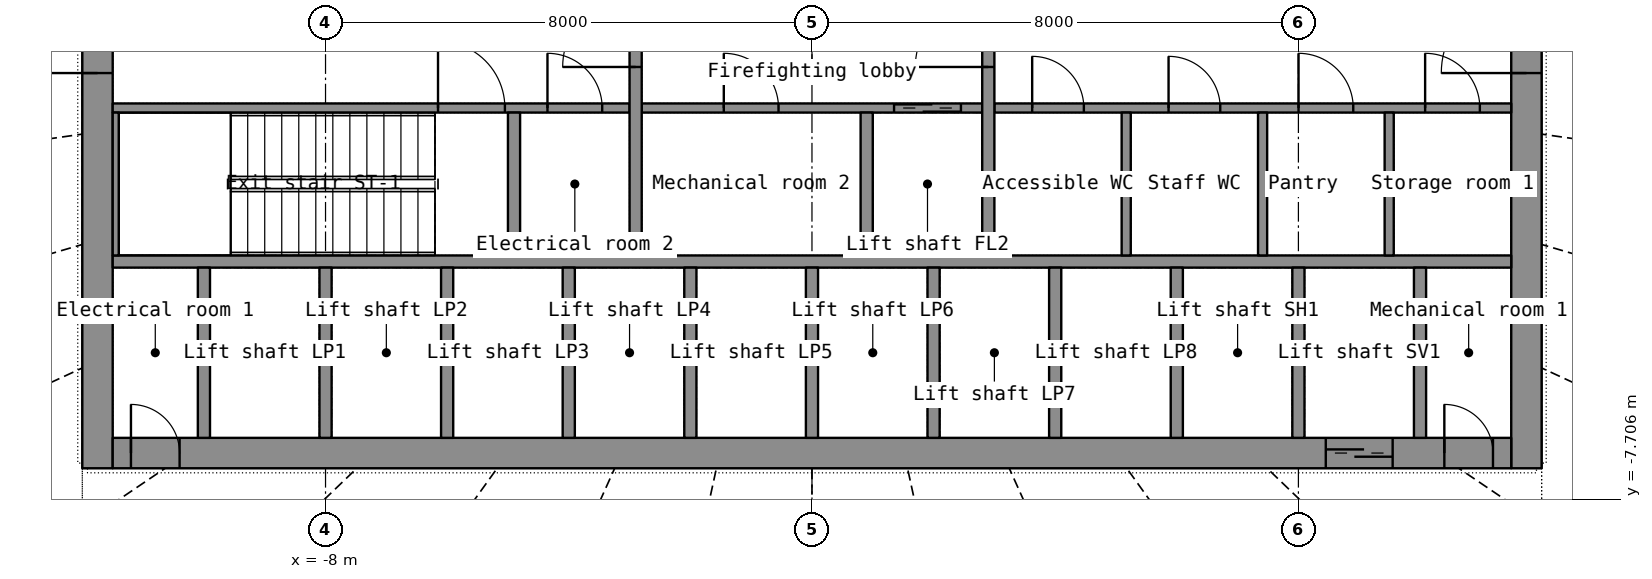
"""IFC4 building model, lengths in metres.
Left out: names, types, materials, properties, quantities, classifications, styles, units other than length and angle.
Written with IfcOpenShell. Run it as: python <this file> out.ifc"""

import sys

from ifc_helpers import new_model, si_unit, direction, frame, frame_2d, origin, place, context, subcontext, project, spatial, rectangle, extrude, element, fill, save


model = new_model("IFC4")
c1 = context("Model", 3, precision=1e-05, world=origin(), true_north=direction((0.0, 1.0)))
c2 = subcontext(c1, "Body", "Model", "MODEL_VIEW")
j1 = project(units=[si_unit("LENGTHUNIT", "METRE"), si_unit("PLANEANGLEUNIT", "RADIAN")], contexts=[c1])
p1 = place(None, origin())
s1 = spatial("IfcSite", under=j1, at=p1, CompositionType="ELEMENT")
p2 = place(p1, origin())
s2 = spatial("IfcBuilding", under=s1, at=p2, CompositionType="ELEMENT")
p3 = place(p2, frame((0.0, 0.0, 152.6)))
s3 = spatial("IfcBuildingStorey", under=s2, at=p3, CompositionType="ELEMENT", Elevation=152.6)
p4 = place(p3, frame((-11.75, -7.2, 0.0), z_axis=(0.0, 0.0, 1.0), x_axis=(0.0, 1.0, 0.0)))
e1 = element("IfcWall", 1, at=p4, inside=s3, PredefinedType="SHEAR", context=c2, shape_type="SweptSolid", body=[
    extrude(rectangle(XDim=14.4, YDim=0.5, at=frame_2d((7.2, 0.0))), origin(), (0.0, 0.0, 1.0), 4.1),
])
p5 = place(p4, frame((6.5, 0.0, 0.0)))
e2 = element("IfcOpeningElement", 2, at=p5, cuts=e1, PredefinedType="OPENING", context=c2, shape_type="SweptSolid", body=[
    extrude(rectangle(XDim=1.4, YDim=2.2, at=frame_2d((0.7, 1.1))), frame((0.0, 0.26, 0.0), z_axis=(0.0, -1.0, 0.0), x_axis=(1.0, 0.0, 0.0)), (0.0, 0.0, 1.0), 0.52),
])
p6 = place(p3, frame((11.75, -7.2, 0.0), z_axis=(0.0, 0.0, 1.0), x_axis=(0.0, 1.0, 0.0)))
e3 = element("IfcWall", 3, at=p6, inside=s3, PredefinedType="SHEAR", context=c2, shape_type="SweptSolid", body=[
    extrude(rectangle(XDim=14.4, YDim=0.5, at=frame_2d((7.2, 0.0))), origin(), (0.0, 0.0, 1.0), 4.1),
])
p7 = place(p6, frame((6.5, 0.0, 0.0)))
e4 = element("IfcOpeningElement", 4, at=p7, cuts=e3, PredefinedType="OPENING", context=c2, shape_type="SweptSolid", body=[
    extrude(rectangle(XDim=1.4, YDim=2.2, at=frame_2d((0.7, 1.1))), frame((0.0, 0.26, 0.0), z_axis=(0.0, -1.0, 0.0), x_axis=(1.0, 0.0, 0.0)), (0.0, 0.0, 1.0), 0.52),
])
p8 = place(p3, frame((-11.5, -6.95, 0.0), z_axis=(0.0, 0.0, 1.0), x_axis=(1.0, 0.0, 0.0)))
e5 = element("IfcWall", 5, at=p8, inside=s3, PredefinedType="SHEAR", context=c2, shape_type="SweptSolid", body=[
    extrude(rectangle(XDim=23.0, YDim=0.5, at=frame_2d((11.5, 0.0))), origin(), (0.0, 0.0, 1.0), 4.1),
])
p9 = place(p8, frame((19.95, 0.0, 0.0)))
e6 = element("IfcOpeningElement", 6, at=p9, cuts=e5, PredefinedType="OPENING", context=c2, shape_type="SweptSolid", body=[
    extrude(rectangle(XDim=1.1, YDim=2.2, at=frame_2d((0.55, 1.1))), frame((0.0, 0.26, 0.0), z_axis=(0.0, -1.0, 0.0), x_axis=(1.0, 0.0, 0.0)), (0.0, 0.0, 1.0), 0.52),
])
p10 = place(p8, frame((0.3, 0.0, 0.0)))
e7 = element("IfcOpeningElement", 7, at=p10, cuts=e5, PredefinedType="OPENING", context=c2, shape_type="SweptSolid", body=[
    extrude(rectangle(XDim=0.8, YDim=2.05, at=frame_2d((0.4, 1.025))), frame((0.0, 0.26, 0.0), z_axis=(0.0, -1.0, 0.0), x_axis=(1.0, 0.0, 0.0)), (0.0, 0.0, 1.0), 0.52),
])
p11 = place(p8, frame((21.9, 0.0, 0.0)))
e8 = element("IfcOpeningElement", 8, at=p11, cuts=e5, PredefinedType="OPENING", context=c2, shape_type="SweptSolid", body=[
    extrude(rectangle(XDim=0.8, YDim=2.05, at=frame_2d((0.4, 1.025))), frame((0.0, 0.26, 0.0), z_axis=(0.0, -1.0, 0.0), x_axis=(1.0, 0.0, 0.0)), (0.0, 0.0, 1.0), 0.52),
])
p12 = place(p3, frame((-11.5, -3.8, 0.0), z_axis=(0.0, 0.0, 1.0), x_axis=(1.0, 0.0, 0.0)))
e9 = element("IfcWall", 9, at=p12, inside=s3, PredefinedType="SHEAR", context=c2, shape_type="SweptSolid", body=[
    extrude(rectangle(XDim=23.0, YDim=0.2, at=frame_2d((11.5, 0.0))), origin(), (0.0, 0.0, 1.0), 4.1),
])
for number, where, z_axis, x_axis in (
    (10, (-10.0, -6.7, 0.0), (0.0, 0.0, 1.0), (0.0, 1.0, 0.0)),
    (11, (-8.0, -6.7, 0.0), (0.0, 0.0, 1.0), (0.0, 1.0, 0.0)),
    (12, (-6.0, -6.7, 0.0), (0.0, 0.0, 1.0), (0.0, 1.0, 0.0)),
    (13, (-4.0, -6.7, 0.0), (0.0, 0.0, 1.0), (0.0, 1.0, 0.0)),
    (14, (-2.0, -6.7, 0.0), (0.0, 0.0, 1.0), (0.0, 1.0, 0.0)),
    (15, (0.0, -6.7, 0.0), (0.0, 0.0, 1.0), (0.0, 1.0, 0.0)),
    (16, (2.0, -6.7, 0.0), (0.0, 0.0, 1.0), (0.0, 1.0, 0.0)),
    (17, (4.0, -6.7, 0.0), (0.0, 0.0, 1.0), (0.0, 1.0, 0.0)),
    (18, (6.0, -6.7, 0.0), (0.0, 0.0, 1.0), (0.0, 1.0, 0.0)),
    (19, (8.0, -6.7, 0.0), (0.0, 0.0, 1.0), (0.0, 1.0, 0.0)),
    (20, (10.0, -6.7, 0.0), (0.0, 0.0, 1.0), (0.0, 1.0, 0.0)),
):
    element("IfcWall", number, at=place(p3, frame(where, z_axis=z_axis, x_axis=x_axis)), inside=s3, PredefinedType="SHEAR", context=c2, shape_type="SweptSolid", body=[
        extrude(rectangle(XDim=2.8, YDim=0.2, at=frame_2d((1.4, 0.0))), origin(), (0.0, 0.0, 1.0), 4.1),
    ])
p13 = place(p3, frame((-11.5, -1.275, 0.0), z_axis=(0.0, 0.0, 1.0), x_axis=(1.0, 0.0, 0.0)))
e21 = element("IfcWall", 21, at=p13, inside=s3, PredefinedType="SHEAR", context=c2, shape_type="SweptSolid", body=[
    extrude(rectangle(XDim=8.5, YDim=0.15, at=frame_2d((4.25, 0.0))), origin(), (0.0, 0.0, 1.0), 4.1),
])
p14 = place(p13, frame((5.35, 0.0, 0.0)))
e22 = element("IfcOpeningElement", 22, at=p14, cuts=e21, PredefinedType="OPENING", context=c2, shape_type="SweptSolid", body=[
    extrude(rectangle(XDim=1.1, YDim=2.15, at=frame_2d((0.55, 1.075))), frame((0.0, 0.085, 0.0), z_axis=(0.0, -1.0, 0.0), x_axis=(1.0, 0.0, 0.0)), (0.0, 0.0, 1.0), 0.17),
])
p15 = place(p13, frame((7.15, 0.0, 0.0)))
e23 = element("IfcOpeningElement", 23, at=p15, cuts=e21, PredefinedType="OPENING", context=c2, shape_type="SweptSolid", body=[
    extrude(rectangle(XDim=0.9, YDim=2.1, at=frame_2d((0.45, 1.05))), frame((0.0, 0.085, 0.0), z_axis=(0.0, -1.0, 0.0), x_axis=(1.0, 0.0, 0.0)), (0.0, 0.0, 1.0), 0.17),
])
p16 = place(p3, frame((-2.8, -1.275, 0.0), z_axis=(0.0, 0.0, 1.0), x_axis=(1.0, 0.0, 0.0)))
e24 = element("IfcWall", 24, at=p16, inside=s3, PredefinedType="SHEAR", context=c2, shape_type="SweptSolid", body=[
    extrude(rectangle(XDim=5.6, YDim=0.15, at=frame_2d((2.8, 0.0))), origin(), (0.0, 0.0, 1.0), 4.1),
])
p17 = place(p16, frame((4.15, 0.0, 0.0)))
e25 = element("IfcOpeningElement", 25, at=p17, cuts=e24, PredefinedType="OPENING", context=c2, shape_type="SweptSolid", body=[
    extrude(rectangle(XDim=1.1, YDim=2.2, at=frame_2d((0.55, 1.1))), frame((0.0, 0.085, 0.0), z_axis=(0.0, -1.0, 0.0), x_axis=(1.0, 0.0, 0.0)), (0.0, 0.0, 1.0), 0.17),
])
p18 = place(p16, frame((1.35, 0.0, 0.0)))
e26 = element("IfcOpeningElement", 26, at=p18, cuts=e24, PredefinedType="OPENING", context=c2, shape_type="SweptSolid", body=[
    extrude(rectangle(XDim=0.9, YDim=2.1, at=frame_2d((0.45, 1.05))), frame((0.0, 0.085, 0.0), z_axis=(0.0, -1.0, 0.0), x_axis=(1.0, 0.0, 0.0)), (0.0, 0.0, 1.0), 0.17),
])
p19 = place(p3, frame((3.0, -1.275, 0.0), z_axis=(0.0, 0.0, 1.0), x_axis=(1.0, 0.0, 0.0)))
e27 = element("IfcWall", 27, at=p19, inside=s3, PredefinedType="PARTITIONING", context=c2, shape_type="SweptSolid", body=[
    extrude(rectangle(XDim=8.5, YDim=0.15, at=frame_2d((4.25, 0.0))), origin(), (0.0, 0.0, 1.0), 4.1),
])
p20 = place(p19, frame((0.622, 0.0, 0.0)))
e28 = element("IfcOpeningElement", 28, at=p20, cuts=e27, PredefinedType="OPENING", context=c2, shape_type="SweptSolid", body=[
    extrude(rectangle(XDim=0.85, YDim=2.1, at=frame_2d((0.425, 1.05))), frame((0.0, 0.085, 0.0), z_axis=(0.0, -1.0, 0.0), x_axis=(1.0, 0.0, 0.0)), (0.0, 0.0, 1.0), 0.17),
])
p21 = place(p19, frame((2.865, 0.0, 0.0)))
e29 = element("IfcOpeningElement", 29, at=p21, cuts=e27, PredefinedType="OPENING", context=c2, shape_type="SweptSolid", body=[
    extrude(rectangle(XDim=0.85, YDim=2.1, at=frame_2d((0.425, 1.05))), frame((0.0, 0.085, 0.0), z_axis=(0.0, -1.0, 0.0), x_axis=(1.0, 0.0, 0.0)), (0.0, 0.0, 1.0), 0.17),
])
p22 = place(p19, frame((5.002, 0.0, 0.0)))
e30 = element("IfcOpeningElement", 30, at=p22, cuts=e27, PredefinedType="OPENING", context=c2, shape_type="SweptSolid", body=[
    extrude(rectangle(XDim=0.9, YDim=2.1, at=frame_2d((0.45, 1.05))), frame((0.0, 0.085, 0.0), z_axis=(0.0, -1.0, 0.0), x_axis=(1.0, 0.0, 0.0)), (0.0, 0.0, 1.0), 0.17),
])
p23 = place(p19, frame((7.084, 0.0, 0.0)))
e31 = element("IfcOpeningElement", 31, at=p23, cuts=e27, PredefinedType="OPENING", context=c2, shape_type="SweptSolid", body=[
    extrude(rectangle(XDim=0.9, YDim=2.1, at=frame_2d((0.45, 1.05))), frame((0.0, 0.085, 0.0), z_axis=(0.0, -1.0, 0.0), x_axis=(1.0, 0.0, 0.0)), (0.0, 0.0, 1.0), 0.17),
])
p24 = place(p3, frame((-2.9, -3.7, 0.0), z_axis=(0.0, 0.0, 1.0), x_axis=(0.0, 1.0, 0.0)))
e32 = element("IfcWall", 32, at=p24, inside=s3, PredefinedType="SHEAR", context=c2, shape_type="SweptSolid", body=[
    extrude(rectangle(XDim=7.4, YDim=0.2, at=frame_2d((3.7, 0.0))), origin(), (0.0, 0.0, 1.0), 4.1),
])
p25 = place(p24, frame((3.1, 0.0, 0.0)))
e33 = element("IfcOpeningElement", 33, at=p25, cuts=e32, PredefinedType="OPENING", context=c2, shape_type="SweptSolid", body=[
    extrude(rectangle(XDim=1.2, YDim=2.2, at=frame_2d((0.6, 1.1))), frame((0.0, 0.11, 0.0), z_axis=(0.0, -1.0, 0.0), x_axis=(1.0, 0.0, 0.0)), (0.0, 0.0, 1.0), 0.22),
])
p26 = place(p3, frame((2.9, -3.7, 0.0), z_axis=(0.0, 0.0, 1.0), x_axis=(0.0, 1.0, 0.0)))
e34 = element("IfcWall", 34, at=p26, inside=s3, PredefinedType="SHEAR", context=c2, shape_type="SweptSolid", body=[
    extrude(rectangle(XDim=7.4, YDim=0.2, at=frame_2d((3.7, 0.0))), origin(), (0.0, 0.0, 1.0), 4.1),
])
p27 = place(p26, frame((3.1, 0.0, 0.0)))
e35 = element("IfcOpeningElement", 35, at=p27, cuts=e34, PredefinedType="OPENING", context=c2, shape_type="SweptSolid", body=[
    extrude(rectangle(XDim=1.2, YDim=2.2, at=frame_2d((0.6, 1.1))), frame((0.0, 0.11, 0.0), z_axis=(0.0, -1.0, 0.0), x_axis=(1.0, 0.0, 0.0)), (0.0, 0.0, 1.0), 0.22),
])
p28 = place(p3, frame((0.9, -3.7, 0.0), z_axis=(0.0, 0.0, 1.0), x_axis=(0.0, 1.0, 0.0)))
e36 = element("IfcWall", 36, at=p28, inside=s3, PredefinedType="SHEAR", context=c2, shape_type="SweptSolid", body=[
    extrude(rectangle(XDim=2.35, YDim=0.2, at=frame_2d((1.175, 0.0))), origin(), (0.0, 0.0, 1.0), 4.1),
])
p29 = place(p3, frame((-11.45, -3.7, 0.0), z_axis=(0.0, 0.0, 1.0), x_axis=(0.0, 1.0, 0.0)))
e37 = element("IfcWall", 37, at=p29, inside=s3, PredefinedType="SHEAR", context=c2, shape_type="SweptSolid", body=[
    extrude(rectangle(XDim=2.35, YDim=0.1, at=frame_2d((1.175, 0.0))), origin(), (0.0, 0.0, 1.0), 4.1),
])
p30 = place(p3, frame((-4.9, -3.7, 0.0), z_axis=(0.0, 0.0, 1.0), x_axis=(0.0, 1.0, 0.0)))
e38 = element("IfcWall", 38, at=p30, inside=s3, PredefinedType="SHEAR", context=c2, shape_type="SweptSolid", body=[
    extrude(rectangle(XDim=2.35, YDim=0.2, at=frame_2d((1.175, 0.0))), origin(), (0.0, 0.0, 1.0), 4.1),
])
for number, where, z_axis, x_axis in (
    (39, (5.168, -3.7, 0.0), (0.0, 0.0, 1.0), (0.0, 1.0, 0.0)),
    (40, (7.411, -3.7, 0.0), (0.0, 0.0, 1.0), (0.0, 1.0, 0.0)),
    (41, (9.493, -3.7, 0.0), (0.0, 0.0, 1.0), (0.0, 1.0, 0.0)),
):
    element("IfcWall", number, at=place(p3, frame(where, z_axis=z_axis, x_axis=x_axis)), inside=s3, PredefinedType="PARTITIONING", context=c2, shape_type="SweptSolid", body=[
        extrude(rectangle(XDim=2.35, YDim=0.15, at=frame_2d((1.175, 0.0))), origin(), (0.0, 0.0, 1.0), 4.1),
    ])
p31 = place(p9, origin())
e42 = element("IfcDoor", 42, at=p31, inside=s3, OperationType="DOUBLE_DOOR_SLIDING", PredefinedType="DOOR", context=c2, shape_type="SweptSolid", body=[
    extrude(rectangle(XDim=1.1, YDim=2.2, at=frame_2d((0.55, 1.1))), frame((0.0, 0.025, 0.0), z_axis=(0.0, -1.0, 0.0), x_axis=(1.0, 0.0, 0.0)), (0.0, 0.0, 1.0), 0.05),
])
fill(e6, e42)
p32 = place(p10, origin())
e43 = element("IfcDoor", 43, at=p32, inside=s3, OperationType="SINGLE_SWING_LEFT", PredefinedType="DOOR", context=c2, shape_type="SweptSolid", body=[
    extrude(rectangle(XDim=0.8, YDim=2.05, at=frame_2d((0.4, 1.025))), frame((0.0, 0.025, 0.0), z_axis=(0.0, -1.0, 0.0), x_axis=(1.0, 0.0, 0.0)), (0.0, 0.0, 1.0), 0.05),
])
fill(e7, e43)
p33 = place(p11, origin())
e44 = element("IfcDoor", 44, at=p33, inside=s3, OperationType="SINGLE_SWING_LEFT", PredefinedType="DOOR", context=c2, shape_type="SweptSolid", body=[
    extrude(rectangle(XDim=0.8, YDim=2.05, at=frame_2d((0.4, 1.025))), frame((0.0, 0.025, 0.0), z_axis=(0.0, -1.0, 0.0), x_axis=(1.0, 0.0, 0.0)), (0.0, 0.0, 1.0), 0.05),
])
fill(e8, e44)
p34 = place(p5, origin())
e45 = element("IfcDoor", 45, at=p34, inside=s3, OperationType="DOUBLE_DOOR_SINGLE_SWING", PredefinedType="DOOR", context=c2, shape_type="SweptSolid", body=[
    extrude(rectangle(XDim=1.4, YDim=2.2, at=frame_2d((0.7, 1.1))), frame((0.0, 0.025, 0.0), z_axis=(0.0, -1.0, 0.0), x_axis=(1.0, 0.0, 0.0)), (0.0, 0.0, 1.0), 0.05),
])
fill(e2, e45)
p35 = place(p7, origin())
e46 = element("IfcDoor", 46, at=p35, inside=s3, OperationType="DOUBLE_DOOR_SINGLE_SWING", PredefinedType="DOOR", context=c2, shape_type="SweptSolid", body=[
    extrude(rectangle(XDim=1.4, YDim=2.2, at=frame_2d((0.7, 1.1))), frame((0.0, 0.025, 0.0), z_axis=(0.0, -1.0, 0.0), x_axis=(1.0, 0.0, 0.0)), (0.0, 0.0, 1.0), 0.05),
])
fill(e4, e46)
p36 = place(p25, origin())
e47 = element("IfcDoor", 47, at=p36, inside=s3, OperationType="SINGLE_SWING_LEFT", PredefinedType="DOOR", context=c2, shape_type="SweptSolid", body=[
    extrude(rectangle(XDim=1.2, YDim=2.2, at=frame_2d((0.6, 1.1))), frame((0.0, 0.025, 0.0), z_axis=(0.0, -1.0, 0.0), x_axis=(1.0, 0.0, 0.0)), (0.0, 0.0, 1.0), 0.05),
])
fill(e33, e47)
p37 = place(p27, origin())
e48 = element("IfcDoor", 48, at=p37, inside=s3, OperationType="SINGLE_SWING_LEFT", PredefinedType="DOOR", context=c2, shape_type="SweptSolid", body=[
    extrude(rectangle(XDim=1.2, YDim=2.2, at=frame_2d((0.6, 1.1))), frame((0.0, 0.025, 0.0), z_axis=(0.0, -1.0, 0.0), x_axis=(1.0, 0.0, 0.0)), (0.0, 0.0, 1.0), 0.05),
])
fill(e35, e48)
p38 = place(p17, origin())
e49 = element("IfcDoor", 49, at=p38, inside=s3, OperationType="DOUBLE_DOOR_SLIDING", PredefinedType="DOOR", context=c2, shape_type="SweptSolid", body=[
    extrude(rectangle(XDim=1.1, YDim=2.2, at=frame_2d((0.55, 1.1))), frame((0.0, 0.025, 0.0), z_axis=(0.0, -1.0, 0.0), x_axis=(1.0, 0.0, 0.0)), (0.0, 0.0, 1.0), 0.05),
])
fill(e25, e49)
p39 = place(p14, origin())
e50 = element("IfcDoor", 50, at=p39, inside=s3, OperationType="SINGLE_SWING_LEFT", PredefinedType="DOOR", context=c2, shape_type="SweptSolid", body=[
    extrude(rectangle(XDim=1.1, YDim=2.15, at=frame_2d((0.55, 1.075))), frame((0.0, 0.025, 0.0), z_axis=(0.0, -1.0, 0.0), x_axis=(1.0, 0.0, 0.0)), (0.0, 0.0, 1.0), 0.05),
])
fill(e22, e50)
p40 = place(p20, origin())
e51 = element("IfcDoor", 51, at=p40, inside=s3, OperationType="SINGLE_SWING_LEFT", PredefinedType="DOOR", context=c2, shape_type="SweptSolid", body=[
    extrude(rectangle(XDim=0.85, YDim=2.1, at=frame_2d((0.425, 1.05))), frame((0.0, 0.025, 0.0), z_axis=(0.0, -1.0, 0.0), x_axis=(1.0, 0.0, 0.0)), (0.0, 0.0, 1.0), 0.05),
])
fill(e28, e51)
p41 = place(p21, origin())
e52 = element("IfcDoor", 52, at=p41, inside=s3, OperationType="SINGLE_SWING_LEFT", PredefinedType="DOOR", context=c2, shape_type="SweptSolid", body=[
    extrude(rectangle(XDim=0.85, YDim=2.1, at=frame_2d((0.425, 1.05))), frame((0.0, 0.025, 0.0), z_axis=(0.0, -1.0, 0.0), x_axis=(1.0, 0.0, 0.0)), (0.0, 0.0, 1.0), 0.05),
])
fill(e29, e52)
p42 = place(p22, origin())
e53 = element("IfcDoor", 53, at=p42, inside=s3, OperationType="SINGLE_SWING_LEFT", PredefinedType="DOOR", context=c2, shape_type="SweptSolid", body=[
    extrude(rectangle(XDim=0.9, YDim=2.1, at=frame_2d((0.45, 1.05))), frame((0.0, 0.025, 0.0), z_axis=(0.0, -1.0, 0.0), x_axis=(1.0, 0.0, 0.0)), (0.0, 0.0, 1.0), 0.05),
])
fill(e30, e53)
p43 = place(p23, origin())
e54 = element("IfcDoor", 54, at=p43, inside=s3, OperationType="SINGLE_SWING_LEFT", PredefinedType="DOOR", context=c2, shape_type="SweptSolid", body=[
    extrude(rectangle(XDim=0.9, YDim=2.1, at=frame_2d((0.45, 1.05))), frame((0.0, 0.025, 0.0), z_axis=(0.0, -1.0, 0.0), x_axis=(1.0, 0.0, 0.0)), (0.0, 0.0, 1.0), 0.05),
])
fill(e31, e54)
p44 = place(p18, origin())
e55 = element("IfcDoor", 55, at=p44, inside=s3, OperationType="SINGLE_SWING_LEFT", PredefinedType="DOOR", context=c2, shape_type="SweptSolid", body=[
    extrude(rectangle(XDim=0.9, YDim=2.1, at=frame_2d((0.45, 1.05))), frame((0.0, 0.025, 0.0), z_axis=(0.0, -1.0, 0.0), x_axis=(1.0, 0.0, 0.0)), (0.0, 0.0, 1.0), 0.05),
])
fill(e26, e55)
p45 = place(p15, origin())
e56 = element("IfcDoor", 56, at=p45, inside=s3, OperationType="SINGLE_SWING_LEFT", PredefinedType="DOOR", context=c2, shape_type="SweptSolid", body=[
    extrude(rectangle(XDim=0.9, YDim=2.1, at=frame_2d((0.45, 1.05))), frame((0.0, 0.025, 0.0), z_axis=(0.0, -1.0, 0.0), x_axis=(1.0, 0.0, 0.0)), (0.0, 0.0, 1.0), 0.05),
])
fill(e23, e56)
save(model, sys.argv[1])
